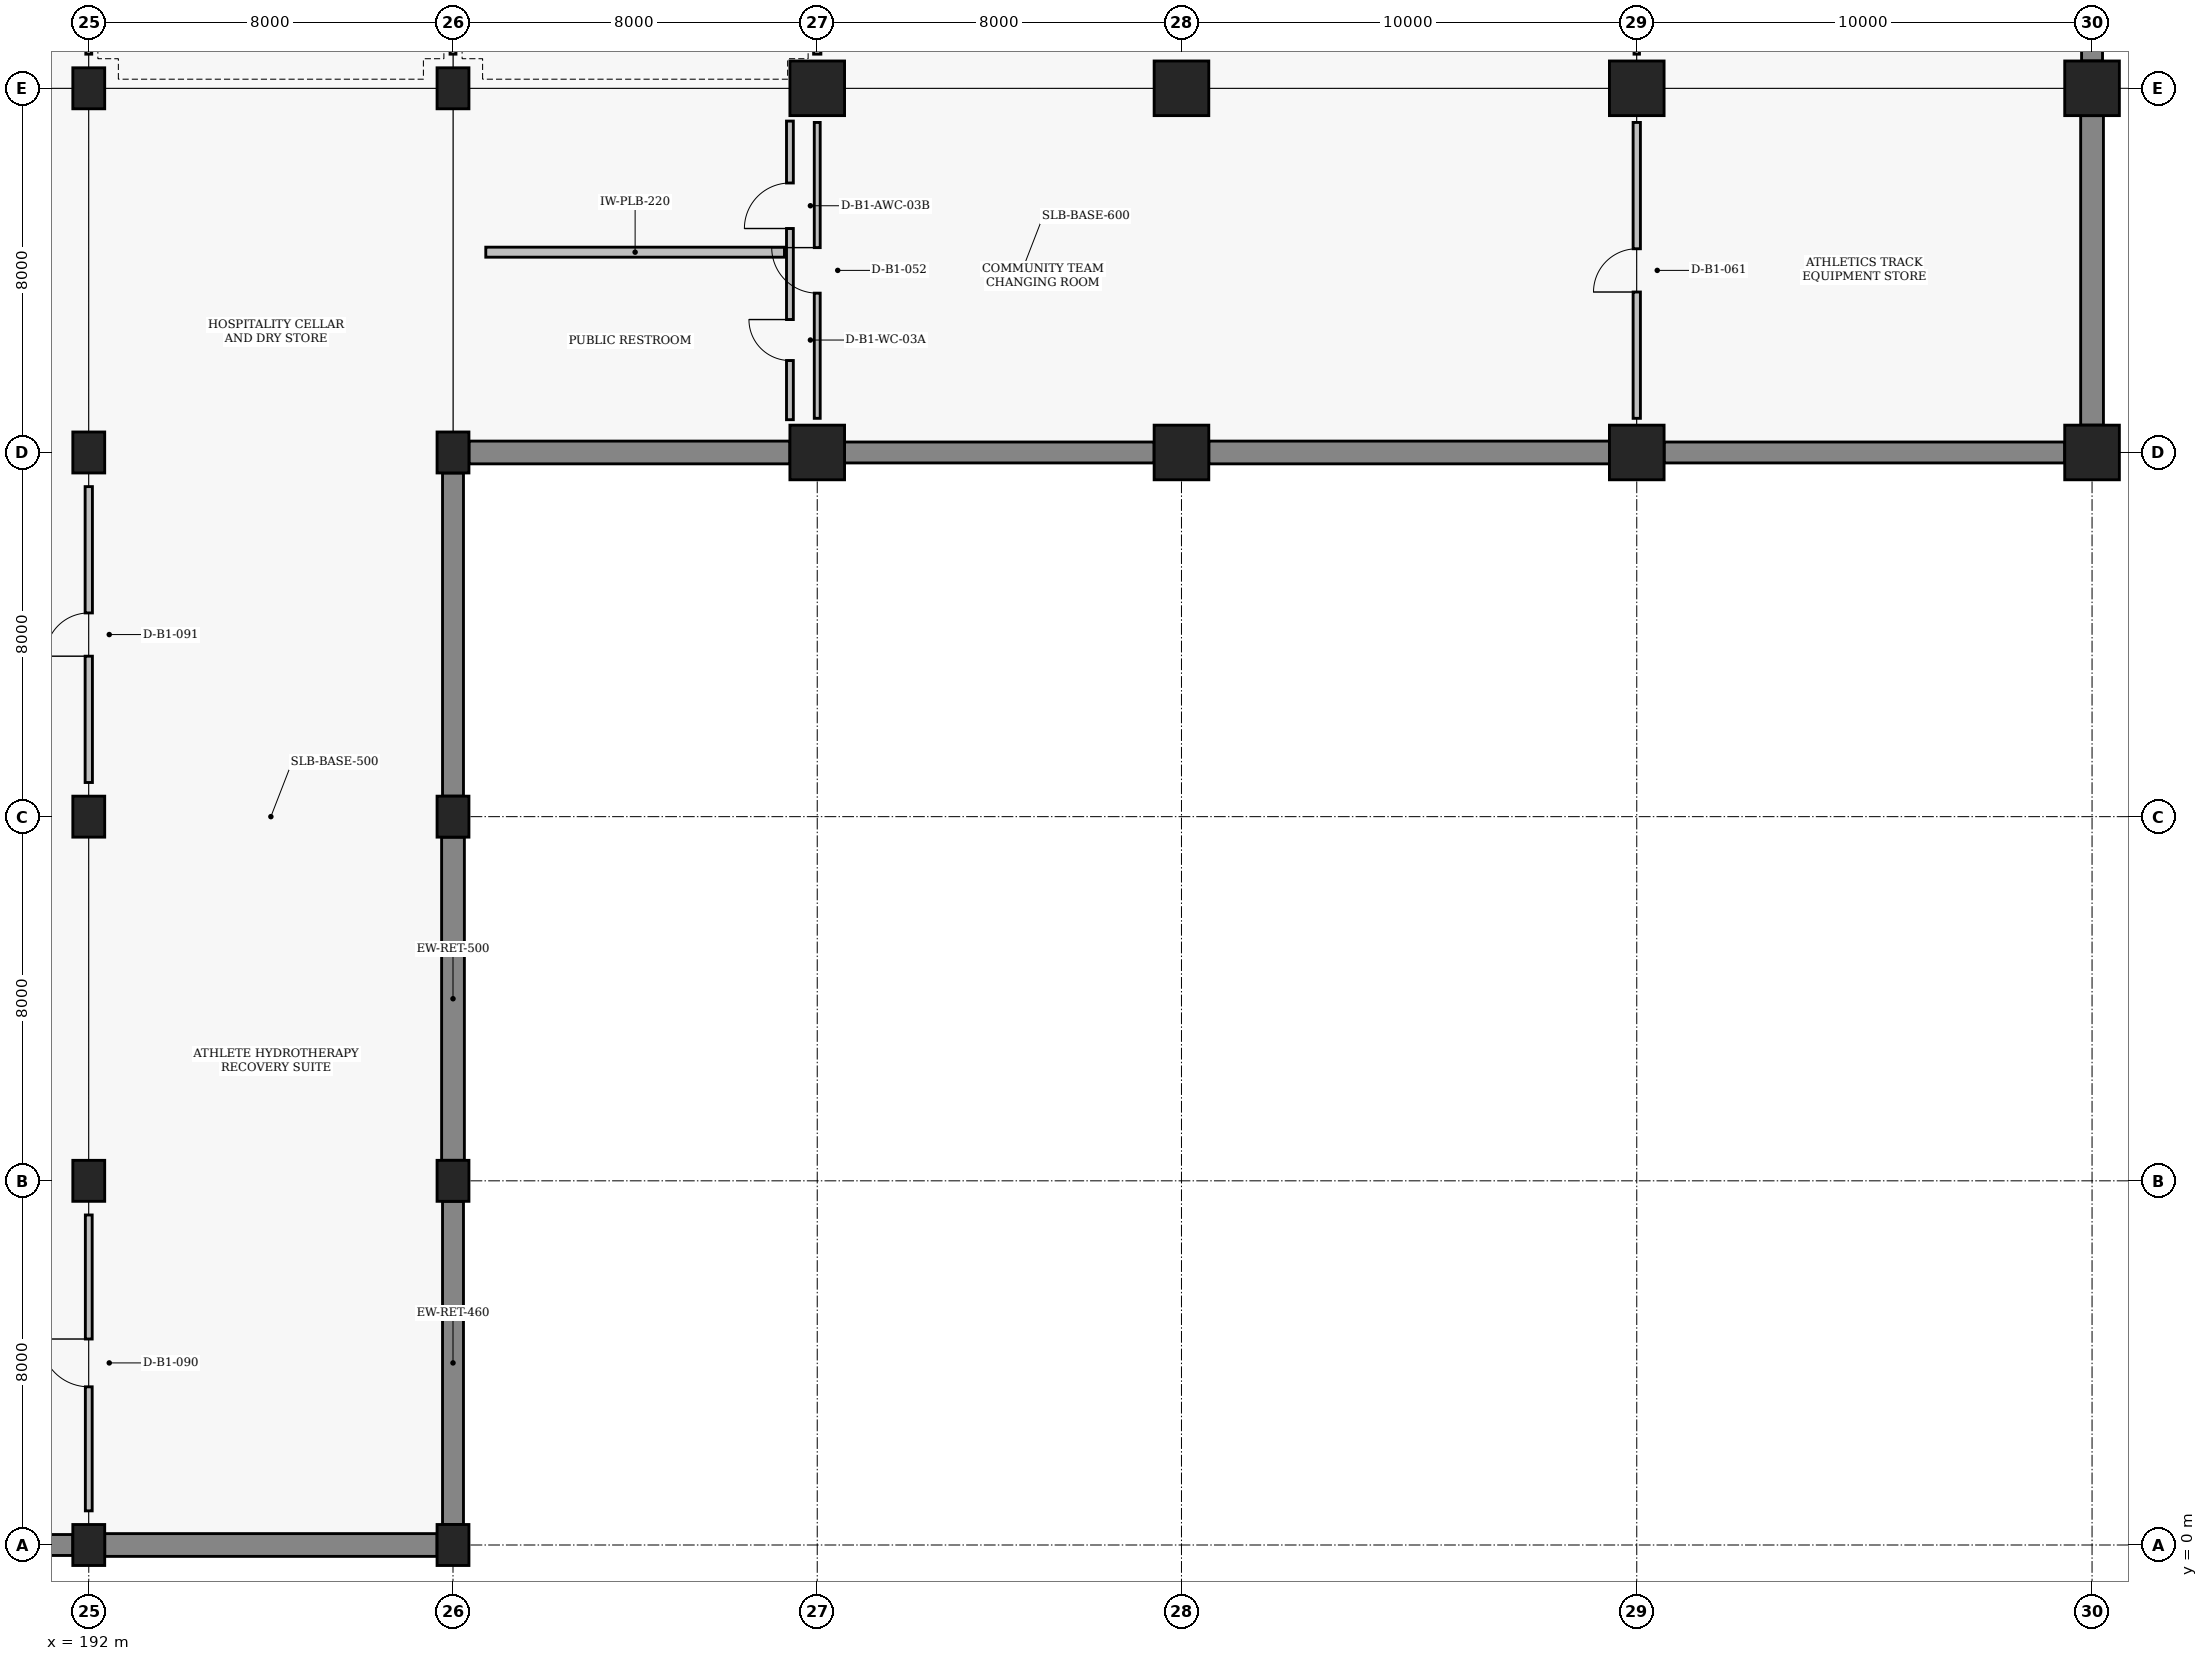
"""IFC4 building model, lengths in metres.
Left out: names, types, materials, properties, quantities, classifications, styles, units other than length and angle.
Written with IfcOpenShell. Run it as: python <this file> out.ifc"""

import sys

from ifc_helpers import new_model, si_unit, direction, frame, frame_2d, origin, origin_2d, place, context, subcontext, project, spatial, rectangle, extrude, element, fill, save


model = new_model("IFC4")
c1 = context("Model", 3, precision=1e-05, world=origin(), true_north=direction((0.0, 1.0)))
c2 = subcontext(c1, "Body", "Model", "MODEL_VIEW")
j1 = project(units=[si_unit("LENGTHUNIT", "METRE"), si_unit("PLANEANGLEUNIT", "RADIAN")], contexts=[c1])
p1 = place(None, origin())
s1 = spatial("IfcSite", under=j1, at=p1, CompositionType="ELEMENT")
p2 = place(p1, origin())
s2 = spatial("IfcBuilding", under=s1, at=p2, CompositionType="ELEMENT")
p3 = place(p2, frame((0.0, 0.0, -5.4)))
s3 = spatial("IfcBuildingStorey", under=s2, at=p3, CompositionType="ELEMENT", Elevation=-5.4)
for number, where, z_axis, x_axis in (
    (1, (192.0, 0.0, 0.0), (0.0, 0.0, 1.0), (1.0, 0.0, 0.0)),
    (2, (192.0, 8.0, 0.0), (0.0, 0.0, 1.0), (1.0, 0.0, 0.0)),
    (3, (192.0, 16.0, 0.0), (0.0, 0.0, 1.0), (1.0, 0.0, 0.0)),
    (4, (192.0, 24.0, 0.0), (0.0, 0.0, 1.0), (1.0, 0.0, 0.0)),
    (5, (192.0, 32.0, 0.0), (0.0, 0.0, 1.0), (1.0, 0.0, 0.0)),
    (6, (200.0, 0.0, 0.0), (0.0, 0.0, 1.0), (1.0, 0.0, 0.0)),
    (7, (200.0, 8.0, 0.0), (0.0, 0.0, 1.0), (1.0, 0.0, 0.0)),
    (8, (200.0, 16.0, 0.0), (0.0, 0.0, 1.0), (1.0, 0.0, 0.0)),
    (9, (200.0, 24.0, 0.0), (0.0, 0.0, 1.0), (1.0, 0.0, 0.0)),
    (10, (200.0, 32.0, 0.0), (0.0, 0.0, 1.0), (1.0, 0.0, 0.0)),
):
    element("IfcColumn", number, at=place(p3, frame(where, z_axis=z_axis, x_axis=x_axis)), inside=s3, PredefinedType="COLUMN", context=c2, shape_type="SweptSolid", body=[
        extrude(rectangle(XDim=0.7, YDim=0.9, at=origin_2d()), origin(), (0.0, 0.0, 1.0), 5.4),
    ])
for number, where, z_axis, x_axis in (
    (11, (208.0, 24.0, 0.0), (0.0, 0.0, 1.0), (1.0, 0.0, 0.0)),
    (12, (208.0, 32.0, 0.0), (0.0, 0.0, 1.0), (1.0, 0.0, 0.0)),
    (13, (216.0, 24.0, 0.0), (0.0, 0.0, 1.0), (1.0, 0.0, 0.0)),
    (14, (216.0, 32.0, 0.0), (0.0, 0.0, 1.0), (1.0, 0.0, 0.0)),
    (15, (226.0, 24.0, 0.0), (0.0, 0.0, 1.0), (1.0, 0.0, 0.0)),
    (16, (226.0, 32.0, 0.0), (0.0, 0.0, 1.0), (1.0, 0.0, 0.0)),
    (17, (236.0, 24.0, 0.0), (0.0, 0.0, 1.0), (1.0, 0.0, 0.0)),
    (18, (236.0, 32.0, 0.0), (0.0, 0.0, 1.0), (1.0, 0.0, 0.0)),
):
    element("IfcColumn", number, at=place(p3, frame(where, z_axis=z_axis, x_axis=x_axis)), inside=s3, PredefinedType="COLUMN", context=c2, shape_type="SweptSolid", body=[
        extrude(rectangle(XDim=1.2, YDim=1.2, at=origin_2d()), origin(), (0.0, 0.0, 1.0), 5.4),
    ])
p4 = place(p3, frame((184.35, 0.0, 0.0), z_axis=(0.0, 0.0, 1.0), x_axis=(1.0, 0.0, 0.0)))
e19 = element("IfcWall", 19, at=p4, inside=s3, PredefinedType="STANDARD", context=c2, shape_type="SweptSolid", body=[
    extrude(rectangle(XDim=7.3, YDim=0.46, at=frame_2d((3.65, 0.0))), origin(), (0.0, 0.0, 1.0), 4.34),
])
p5 = place(p3, frame((192.35, 0.0, 0.0), z_axis=(0.0, 0.0, 1.0), x_axis=(1.0, 0.0, 0.0)))
e20 = element("IfcWall", 20, at=p5, inside=s3, PredefinedType="STANDARD", context=c2, shape_type="SweptSolid", body=[
    extrude(rectangle(XDim=7.3, YDim=0.5, at=frame_2d((3.65, 0.0))), origin(), (0.0, 0.0, 1.0), 4.24),
])
p6 = place(p3, frame((200.0, 0.45, 0.0), z_axis=(0.0, 0.0, 1.0), x_axis=(0.0, 1.0, 0.0)))
e21 = element("IfcWall", 21, at=p6, inside=s3, PredefinedType="STANDARD", context=c2, shape_type="SweptSolid", body=[
    extrude(rectangle(XDim=7.1, YDim=0.46, at=frame_2d((3.55, 0.0))), origin(), (0.0, 0.0, 1.0), 4.24),
])
p7 = place(p3, frame((200.0, 8.45, 0.0), z_axis=(0.0, 0.0, 1.0), x_axis=(0.0, 1.0, 0.0)))
e22 = element("IfcWall", 22, at=p7, inside=s3, PredefinedType="STANDARD", context=c2, shape_type="SweptSolid", body=[
    extrude(rectangle(XDim=7.1, YDim=0.5, at=frame_2d((3.55, 0.0))), origin(), (0.0, 0.0, 1.0), 4.24),
])
p8 = place(p3, frame((200.0, 16.45, 0.0), z_axis=(0.0, 0.0, 1.0), x_axis=(0.0, 1.0, 0.0)))
e23 = element("IfcWall", 23, at=p8, inside=s3, PredefinedType="STANDARD", context=c2, shape_type="SweptSolid", body=[
    extrude(rectangle(XDim=7.1, YDim=0.46, at=frame_2d((3.55, 0.0))), origin(), (0.0, 0.0, 1.0), 4.24),
])
p9 = place(p3, frame((200.35, 24.0, 0.0), z_axis=(0.0, 0.0, 1.0), x_axis=(1.0, 0.0, 0.0)))
e24 = element("IfcWall", 24, at=p9, inside=s3, PredefinedType="STANDARD", context=c2, shape_type="SweptSolid", body=[
    extrude(rectangle(XDim=7.05, YDim=0.5, at=frame_2d((3.525, 0.0))), origin(), (0.0, 0.0, 1.0), 4.24),
])
p10 = place(p3, frame((208.6, 24.0, 0.0), z_axis=(0.0, 0.0, 1.0), x_axis=(1.0, 0.0, 0.0)))
e25 = element("IfcWall", 25, at=p10, inside=s3, PredefinedType="STANDARD", context=c2, shape_type="SweptSolid", body=[
    extrude(rectangle(XDim=6.8, YDim=0.46, at=frame_2d((3.4, 0.0))), origin(), (0.0, 0.0, 1.0), 4.34),
])
p11 = place(p3, frame((216.6, 24.0, 0.0), z_axis=(0.0, 0.0, 1.0), x_axis=(1.0, 0.0, 0.0)))
e26 = element("IfcWall", 26, at=p11, inside=s3, PredefinedType="STANDARD", context=c2, shape_type="SweptSolid", body=[
    extrude(rectangle(XDim=8.8, YDim=0.5, at=frame_2d((4.4, 0.0))), origin(), (0.0, 0.0, 1.0), 4.34),
])
p12 = place(p3, frame((226.6, 24.0, 0.0), z_axis=(0.0, 0.0, 1.0), x_axis=(1.0, 0.0, 0.0)))
e27 = element("IfcWall", 27, at=p12, inside=s3, PredefinedType="STANDARD", context=c2, shape_type="SweptSolid", body=[
    extrude(rectangle(XDim=8.8, YDim=0.46, at=frame_2d((4.4, 0.0))), origin(), (0.0, 0.0, 1.0), 4.24),
])
p13 = place(p3, frame((236.0, 24.6, 0.0), z_axis=(0.0, 0.0, 1.0), x_axis=(0.0, 1.0, 0.0)))
e28 = element("IfcWall", 28, at=p13, inside=s3, PredefinedType="STANDARD", context=c2, shape_type="SweptSolid", body=[
    extrude(rectangle(XDim=6.8, YDim=0.5, at=frame_2d((3.4, 0.0))), origin(), (0.0, 0.0, 1.0), 4.24),
])
p14 = place(p3, frame((236.0, 32.6, 0.0), z_axis=(0.0, 0.0, 1.0), x_axis=(0.0, 1.0, 0.0)))
e29 = element("IfcWall", 29, at=p14, inside=s3, PredefinedType="STANDARD", context=c2, shape_type="SweptSolid", body=[
    extrude(rectangle(XDim=6.8, YDim=0.46, at=frame_2d((3.4, 0.0))), origin(), (0.0, 0.0, 1.0), 4.24),
])
p15 = place(p3, frame((200.72, 28.4, 0.0), z_axis=(0.0, 0.0, 1.0), x_axis=(1.0, 0.0, 0.0)))
e30 = element("IfcWall", 30, at=p15, inside=s3, PredefinedType="PLUMBINGWALL", context=c2, shape_type="SweptSolid", body=[
    extrude(rectangle(XDim=6.56, YDim=0.22, at=frame_2d((3.28, 0.0))), origin(), (0.0, 0.0, 1.0), 4.69),
])
p16 = place(p3, frame((207.4, 24.72, 0.0), z_axis=(0.0, 0.0, 1.0), x_axis=(0.0, 1.0, 0.0)))
e31 = element("IfcWall", 31, at=p16, inside=s3, PredefinedType="PARTITIONING", context=c2, shape_type="SweptSolid", body=[
    extrude(rectangle(XDim=6.56, YDim=0.15, at=frame_2d((3.28, 0.0))), origin(), (0.0, 0.0, 1.0), 4.69),
])
p17 = place(p16, frame((1.3, 0.0, 0.0)))
e32 = element("IfcOpeningElement", 32, at=p17, cuts=e31, PredefinedType="OPENING", context=c2, shape_type="SweptSolid", body=[
    extrude(rectangle(XDim=0.9, YDim=2.1, at=frame_2d((0.45, 1.05))), frame((0.0, 0.085, 0.0), z_axis=(0.0, -1.0, 0.0), x_axis=(1.0, 0.0, 0.0)), (0.0, 0.0, 1.0), 0.17),
])
p18 = place(p16, frame((4.2, 0.0, 0.0)))
e33 = element("IfcOpeningElement", 33, at=p18, cuts=e31, PredefinedType="OPENING", context=c2, shape_type="SweptSolid", body=[
    extrude(rectangle(XDim=1.0, YDim=2.15, at=frame_2d((0.5, 1.075))), frame((0.0, 0.085, 0.0), z_axis=(0.0, -1.0, 0.0), x_axis=(1.0, 0.0, 0.0)), (0.0, 0.0, 1.0), 0.17),
])
p19 = place(p3, frame((200.0, 32.75, 0.0), z_axis=(0.0, 0.0, 1.0), x_axis=(0.0, 1.0, 0.0)))
e34 = element("IfcWall", 34, at=p19, inside=s3, PredefinedType="PARTITIONING", context=c2, shape_type="SweptSolid", body=[
    extrude(rectangle(XDim=6.5, YDim=0.13, at=frame_2d((3.25, 0.0))), origin(), (0.0, 0.0, 1.0), 3.69),
])
p20 = place(p19, frame((2.75, 0.0, 0.0)))
e35 = element("IfcOpeningElement", 35, at=p20, cuts=e34, PredefinedType="OPENING", context=c2, shape_type="SweptSolid", body=[
    extrude(rectangle(XDim=1.0, YDim=2.1, at=frame_2d((0.5, 1.05))), frame((0.0, 0.075, 0.0), z_axis=(0.0, -1.0, 0.0), x_axis=(1.0, 0.0, 0.0)), (0.0, 0.0, 1.0), 0.15),
])
p21 = place(p3, frame((208.0, 24.75, 0.0), z_axis=(0.0, 0.0, 1.0), x_axis=(0.0, 1.0, 0.0)))
e36 = element("IfcWall", 36, at=p21, inside=s3, PredefinedType="PARTITIONING", context=c2, shape_type="SweptSolid", body=[
    extrude(rectangle(XDim=6.5, YDim=0.13, at=frame_2d((3.25, 0.0))), origin(), (0.0, 0.0, 1.0), 4.39),
])
p22 = place(p21, frame((2.75, 0.0, 0.0)))
e37 = element("IfcOpeningElement", 37, at=p22, cuts=e36, PredefinedType="OPENING", context=c2, shape_type="SweptSolid", body=[
    extrude(rectangle(XDim=1.0, YDim=2.1, at=frame_2d((0.5, 1.05))), frame((0.0, 0.075, 0.0), z_axis=(0.0, -1.0, 0.0), x_axis=(1.0, 0.0, 0.0)), (0.0, 0.0, 1.0), 0.15),
])
p23 = place(p3, frame((208.0, 32.75, 0.0), z_axis=(0.0, 0.0, 1.0), x_axis=(0.0, 1.0, 0.0)))
e38 = element("IfcWall", 38, at=p23, inside=s3, PredefinedType="PARTITIONING", context=c2, shape_type="SweptSolid", body=[
    extrude(rectangle(XDim=6.5, YDim=0.16, at=frame_2d((3.25, 0.0))), origin(), (0.0, 0.0, 1.0), 4.39),
])
p24 = place(p23, frame((2.775, 0.0, 0.0)))
e39 = element("IfcOpeningElement", 39, at=p24, cuts=e38, PredefinedType="OPENING", context=c2, shape_type="SweptSolid", body=[
    extrude(rectangle(XDim=0.95, YDim=2.1, at=frame_2d((0.475, 1.05))), frame((0.0, 0.09, 0.0), z_axis=(0.0, -1.0, 0.0), x_axis=(1.0, 0.0, 0.0)), (0.0, 0.0, 1.0), 0.18),
])
p25 = place(p3, frame((226.0, 24.75, 0.0), z_axis=(0.0, 0.0, 1.0), x_axis=(0.0, 1.0, 0.0)))
e40 = element("IfcWall", 40, at=p25, inside=s3, PredefinedType="PARTITIONING", context=c2, shape_type="SweptSolid", body=[
    extrude(rectangle(XDim=6.5, YDim=0.16, at=frame_2d((3.25, 0.0))), origin(), (0.0, 0.0, 1.0), 4.39),
])
p26 = place(p25, frame((2.775, 0.0, 0.0)))
e41 = element("IfcOpeningElement", 41, at=p26, cuts=e40, PredefinedType="OPENING", context=c2, shape_type="SweptSolid", body=[
    extrude(rectangle(XDim=0.95, YDim=2.1, at=frame_2d((0.475, 1.05))), frame((0.0, 0.09, 0.0), z_axis=(0.0, -1.0, 0.0), x_axis=(1.0, 0.0, 0.0)), (0.0, 0.0, 1.0), 0.18),
])
p27 = place(p3, frame((226.0, 32.75, 0.0), z_axis=(0.0, 0.0, 1.0), x_axis=(0.0, 1.0, 0.0)))
e42 = element("IfcWall", 42, at=p27, inside=s3, PredefinedType="PARTITIONING", context=c2, shape_type="SweptSolid", body=[
    extrude(rectangle(XDim=6.5, YDim=0.12, at=frame_2d((3.25, 0.0))), origin(), (0.0, 0.0, 1.0), 4.39),
])
p28 = place(p27, frame((2.75, 0.0, 0.0)))
e43 = element("IfcOpeningElement", 43, at=p28, cuts=e42, PredefinedType="OPENING", context=c2, shape_type="SweptSolid", body=[
    extrude(rectangle(XDim=1.0, YDim=2.1, at=frame_2d((0.5, 1.05))), frame((0.0, 0.07, 0.0), z_axis=(0.0, -1.0, 0.0), x_axis=(1.0, 0.0, 0.0)), (0.0, 0.0, 1.0), 0.14),
])
p29 = place(p3, frame((192.0, 0.75, 0.0), z_axis=(0.0, 0.0, 1.0), x_axis=(0.0, 1.0, 0.0)))
e44 = element("IfcWall", 44, at=p29, inside=s3, PredefinedType="PARTITIONING", context=c2, shape_type="SweptSolid", body=[
    extrude(rectangle(XDim=6.5, YDim=0.15, at=frame_2d((3.25, 0.0))), origin(), (0.0, 0.0, 1.0), 4.39),
])
p30 = place(p29, frame((2.725, 0.0, 0.0)))
e45 = element("IfcOpeningElement", 45, at=p30, cuts=e44, PredefinedType="OPENING", context=c2, shape_type="SweptSolid", body=[
    extrude(rectangle(XDim=1.05, YDim=2.15, at=frame_2d((0.525, 1.075))), frame((0.0, 0.085, 0.0), z_axis=(0.0, -1.0, 0.0), x_axis=(1.0, 0.0, 0.0)), (0.0, 0.0, 1.0), 0.17),
])
p31 = place(p3, frame((192.0, 16.75, 0.0), z_axis=(0.0, 0.0, 1.0), x_axis=(0.0, 1.0, 0.0)))
e46 = element("IfcWall", 46, at=p31, inside=s3, PredefinedType="PARTITIONING", context=c2, shape_type="SweptSolid", body=[
    extrude(rectangle(XDim=6.5, YDim=0.16, at=frame_2d((3.25, 0.0))), origin(), (0.0, 0.0, 1.0), 4.39),
])
p32 = place(p31, frame((2.775, 0.0, 0.0)))
e47 = element("IfcOpeningElement", 47, at=p32, cuts=e46, PredefinedType="OPENING", context=c2, shape_type="SweptSolid", body=[
    extrude(rectangle(XDim=0.95, YDim=2.1, at=frame_2d((0.475, 1.05))), frame((0.0, 0.09, 0.0), z_axis=(0.0, -1.0, 0.0), x_axis=(1.0, 0.0, 0.0)), (0.0, 0.0, 1.0), 0.18),
])
p33 = place(p3, frame((192.0, 32.75, 0.0), z_axis=(0.0, 0.0, 1.0), x_axis=(0.0, 1.0, 0.0)))
e48 = element("IfcWall", 48, at=p33, inside=s3, PredefinedType="PARTITIONING", context=c2, shape_type="SweptSolid", body=[
    extrude(rectangle(XDim=6.5, YDim=0.13, at=frame_2d((3.25, 0.0))), origin(), (0.0, 0.0, 1.0), 3.69),
])
p34 = place(p33, frame((2.75, 0.0, 0.0)))
e49 = element("IfcOpeningElement", 49, at=p34, cuts=e48, PredefinedType="OPENING", context=c2, shape_type="SweptSolid", body=[
    extrude(rectangle(XDim=1.0, YDim=2.1, at=frame_2d((0.5, 1.05))), frame((0.0, 0.075, 0.0), z_axis=(0.0, -1.0, 0.0), x_axis=(1.0, 0.0, 0.0)), (0.0, 0.0, 1.0), 0.15),
])
p35 = place(p17, origin())
e50 = element("IfcDoor", 50, at=p35, inside=s3, OperationType="SINGLE_SWING_RIGHT", PredefinedType="DOOR", context=c2, shape_type="SweptSolid", body=[
    extrude(rectangle(XDim=0.9, YDim=2.1, at=frame_2d((0.45, 1.05))), frame((0.0, 0.025, 0.0), z_axis=(0.0, -1.0, 0.0), x_axis=(1.0, 0.0, 0.0)), (0.0, 0.0, 1.0), 0.05),
])
fill(e32, e50)
p36 = place(p18, origin())
e51 = element("IfcDoor", 51, at=p36, inside=s3, OperationType="SINGLE_SWING_LEFT", PredefinedType="DOOR", context=c2, shape_type="SweptSolid", body=[
    extrude(rectangle(XDim=1.0, YDim=2.15, at=frame_2d((0.5, 1.075))), frame((0.0, 0.025, 0.0), z_axis=(0.0, -1.0, 0.0), x_axis=(1.0, 0.0, 0.0)), (0.0, 0.0, 1.0), 0.05),
])
fill(e33, e51)
p37 = place(p22, origin())
e52 = element("IfcDoor", 52, at=p37, inside=s3, OperationType="SINGLE_SWING_RIGHT", PredefinedType="DOOR", context=c2, shape_type="SweptSolid", body=[
    extrude(rectangle(XDim=1.0, YDim=2.1, at=frame_2d((0.5, 1.05))), frame((0.0, 0.025, 0.0), z_axis=(0.0, -1.0, 0.0), x_axis=(1.0, 0.0, 0.0)), (0.0, 0.0, 1.0), 0.05),
])
fill(e37, e52)
p38 = place(p26, origin())
e53 = element("IfcDoor", 53, at=p38, inside=s3, OperationType="SINGLE_SWING_LEFT", PredefinedType="DOOR", context=c2, shape_type="SweptSolid", body=[
    extrude(rectangle(XDim=0.95, YDim=2.1, at=frame_2d((0.475, 1.05))), frame((0.0, 0.025, 0.0), z_axis=(0.0, -1.0, 0.0), x_axis=(1.0, 0.0, 0.0)), (0.0, 0.0, 1.0), 0.05),
])
fill(e41, e53)
p39 = place(p30, origin())
e54 = element("IfcDoor", 54, at=p39, inside=s3, OperationType="SINGLE_SWING_RIGHT", PredefinedType="DOOR", context=c2, shape_type="SweptSolid", body=[
    extrude(rectangle(XDim=1.05, YDim=2.15, at=frame_2d((0.525, 1.075))), frame((0.0, 0.025, 0.0), z_axis=(0.0, -1.0, 0.0), x_axis=(1.0, 0.0, 0.0)), (0.0, 0.0, 1.0), 0.05),
])
fill(e45, e54)
p40 = place(p32, origin())
e55 = element("IfcDoor", 55, at=p40, inside=s3, OperationType="SINGLE_SWING_LEFT", PredefinedType="DOOR", context=c2, shape_type="SweptSolid", body=[
    extrude(rectangle(XDim=0.95, YDim=2.1, at=frame_2d((0.475, 1.05))), frame((0.0, 0.025, 0.0), z_axis=(0.0, -1.0, 0.0), x_axis=(1.0, 0.0, 0.0)), (0.0, 0.0, 1.0), 0.05),
])
fill(e47, e55)
save(model, sys.argv[1])
